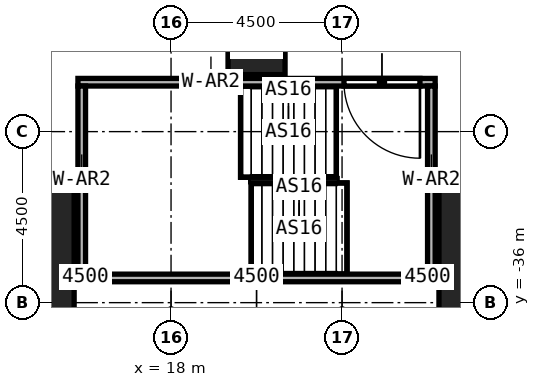
"""IFC4 building model, lengths in metres.
Left out: names, types, materials, properties, quantities, classifications, styles, units other than length and angle.
Written with IfcOpenShell. Run it as: python <this file> out.ifc"""

import sys

from ifc_helpers import new_model, si_unit, direction, frame, frame_2d, origin, origin_2d, place, context, subcontext, project, spatial, rectangle, extrude, element, fill, save


model = new_model("IFC4")
c1 = context("Model", 3, precision=1e-05, world=origin(), true_north=direction((0.0, 1.0)))
c2 = subcontext(c1, "Body", "Model", "MODEL_VIEW")
j1 = project(units=[si_unit("LENGTHUNIT", "METRE"), si_unit("PLANEANGLEUNIT", "RADIAN")], contexts=[c1])
p1 = place(None, origin())
s1 = spatial("IfcSite", under=j1, at=p1, CompositionType="ELEMENT")
p2 = place(p1, origin())
s2 = spatial("IfcBuilding", under=s1, at=p2, CompositionType="ELEMENT")
p3 = place(p2, frame((0.0, 0.0, 19.0)))
s3 = spatial("IfcBuildingStorey", under=s2, at=p3, CompositionType="ELEMENT", Elevation=19.0)
for number, where, z_axis, x_axis in (
    (1, (13.5, -35.85, 0.0), (0.0, 0.0, 1.0), (1.0, 0.0, 0.0)),
    (2, (27.0, -35.85, 0.0), (0.0, 0.0, 1.0), (1.0, 0.0, 0.0)),
):
    element("IfcColumn", number, at=place(p3, frame(where, z_axis=z_axis, x_axis=x_axis)), inside=s3, PredefinedType="COLUMN", context=c2, shape_type="SweptSolid", body=[
        extrude(rectangle(XDim=3.9, YDim=6.3, at=origin_2d()), origin(), (0.0, 0.0, 1.0), 6.0),
    ])
p4 = place(p3, frame((20.25, -29.25, 0.0), z_axis=(0.0, 0.0, 1.0), x_axis=(1.0, 0.0, 0.0)))
e3 = element("IfcColumn", 3, at=p4, inside=s3, PredefinedType="COLUMN", context=c2, shape_type="SweptSolid", body=[
    extrude(rectangle(XDim=1.5, YDim=1.5, at=origin_2d()), origin(), (0.0, 0.0, 1.0), 6.0),
])
p5 = place(p3, frame((24.95, -30.2, 0.0), z_axis=(0.0, 0.0, 1.0), x_axis=(-1.0, 0.0, 0.0)))
e4 = element("IfcWall", 4, at=p5, inside=s3, PredefinedType="SOLIDWALL", context=c2, shape_type="SweptSolid", body=[
    extrude(rectangle(XDim=9.4, YDim=0.2, at=frame_2d((4.7, 0.0))), origin(), (0.0, 0.0, 1.0), 6.0),
])
p6 = place(p5, frame((0.4, 0.0, 0.0)))
e5 = element("IfcOpeningElement", 5, at=p6, cuts=e4, PredefinedType="OPENING", context=c2, shape_type="SweptSolid", body=[
    extrude(rectangle(XDim=2.0, YDim=2.4, at=frame_2d((1.0, 1.2))), frame((0.0, 0.1, 0.0), z_axis=(0.0, -1.0, 0.0), x_axis=(1.0, 0.0, 0.0)), (0.0, 0.0, 1.0), 0.2),
])
p7 = place(p3, frame((15.55, -35.35, 0.0), z_axis=(0.0, 0.0, 1.0), x_axis=(1.0, 0.0, 0.0)))
e6 = element("IfcWall", 6, at=p7, inside=s3, PredefinedType="SOLIDWALL", context=c2, shape_type="SweptSolid", body=[
    extrude(rectangle(XDim=9.4, YDim=0.2, at=frame_2d((4.7, 0.0))), origin(), (0.0, 0.0, 1.0), 6.0),
])
for number, where, z_axis, x_axis in (
    (7, (15.65, -35.25, 0.0), (0.0, 0.0, 1.0), (0.0, 1.0, 0.0)),
    (8, (24.85, -35.25, 0.0), (0.0, 0.0, 1.0), (0.0, 1.0, 0.0)),
):
    element("IfcWall", number, at=place(p3, frame(where, z_axis=z_axis, x_axis=x_axis)), inside=s3, PredefinedType="SOLIDWALL", context=c2, shape_type="SweptSolid", body=[
        extrude(rectangle(XDim=4.95, YDim=0.2, at=frame_2d((2.475, 0.0))), origin(), (0.0, 0.0, 1.0), 6.0),
    ])
p8 = place(p6, origin())
e9 = element("IfcDoor", 9, at=p8, inside=s3, OperationType="DOUBLE_DOOR_SINGLE_SWING", PredefinedType="DOOR", context=c2, shape_type="SweptSolid", body=[
    extrude(rectangle(XDim=2.0, YDim=2.4, at=frame_2d((1.0, 1.2))), frame((0.0, 0.025, 0.0), z_axis=(0.0, -1.0, 0.0), x_axis=(1.0, 0.0, 0.0)), (0.0, 0.0, 1.0), 0.05),
])
fill(e5, e9)
save(model, sys.argv[1])
